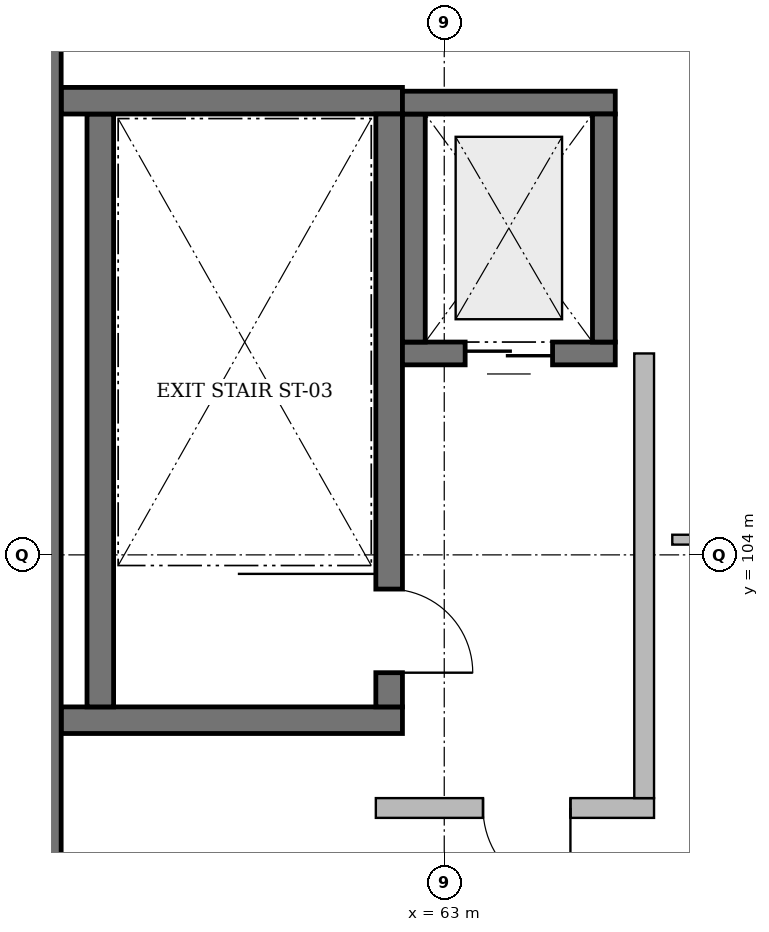
"""IFC4 building model, lengths in metres.
Left out: names, types, materials, properties, quantities, classifications, styles, units other than length and angle.
Written with IfcOpenShell. Run it as: python <this file> out.ifc"""

import sys

from ifc_helpers import new_model, si_unit, direction, frame, frame_2d, origin, place, context, subcontext, project, spatial, rectangle, extrude, element, fill, save


model = new_model("IFC4")
c1 = context("Model", 3, precision=1e-05, world=origin(), true_north=direction((0.0, 1.0)))
c2 = subcontext(c1, "Body", "Model", "MODEL_VIEW")
j1 = project(units=[si_unit("LENGTHUNIT", "METRE"), si_unit("PLANEANGLEUNIT", "RADIAN")], contexts=[c1])
p1 = place(None, origin())
s1 = spatial("IfcSite", under=j1, at=p1, CompositionType="ELEMENT")
p2 = place(p1, origin())
s2 = spatial("IfcBuilding", under=s1, at=p2, CompositionType="ELEMENT")
p3 = place(p2, frame((0.0, 0.0, 21.0)))
s3 = spatial("IfcBuildingStorey", under=s2, at=p3, CompositionType="ELEMENT", Elevation=21.0)
p4 = place(p3, frame((62.45, 101.825, 0.0), z_axis=(0.0, 0.0, 1.0), x_axis=(-1.0, 0.0, 0.0)))
e1 = element("IfcWall", 1, at=p4, inside=s3, PredefinedType="SOLIDWALL", context=c2, shape_type="SweptSolid", body=[
    extrude(rectangle(XDim=4.49, YDim=0.35, at=frame_2d((2.245, 0.0))), origin(), (0.0, 0.0, 1.0), 3.75),
])
p5 = place(p3, frame((58.475, 102.0, 0.0), z_axis=(0.0, 0.0, 1.0), x_axis=(0.0, 1.0, 0.0)))
e2 = element("IfcWall", 2, at=p5, inside=s3, PredefinedType="SOLIDWALL", context=c2, shape_type="SweptSolid", body=[
    extrude(rectangle(XDim=7.8, YDim=0.35, at=frame_2d((3.9, 0.0))), origin(), (0.0, 0.0, 1.0), 3.75),
])
p6 = place(p3, frame((57.96, 109.975, 0.0), z_axis=(0.0, 0.0, 1.0), x_axis=(1.0, 0.0, 0.0)))
e3 = element("IfcWall", 3, at=p6, inside=s3, PredefinedType="SOLIDWALL", context=c2, shape_type="SweptSolid", body=[
    extrude(rectangle(XDim=4.49, YDim=0.35, at=frame_2d((2.245, 0.0))), origin(), (0.0, 0.0, 1.0), 3.75),
])
p7 = place(p3, frame((62.275, 109.8, 0.0), z_axis=(0.0, 0.0, 1.0), x_axis=(0.0, -1.0, 0.0)))
e4 = element("IfcWall", 4, at=p7, inside=s3, PredefinedType="SOLIDWALL", context=c2, shape_type="SweptSolid", body=[
    extrude(rectangle(XDim=7.8, YDim=0.35, at=frame_2d((3.9, 0.0))), origin(), (0.0, 0.0, 1.0), 3.75),
])
p8 = place(p7, frame((6.25, 0.0, 0.0)))
e5 = element("IfcOpeningElement", 5, at=p8, cuts=e4, PredefinedType="OPENING", context=c2, shape_type="SweptSolid", body=[
    extrude(rectangle(XDim=1.1, YDim=2.15, at=frame_2d((0.55, 1.075))), frame((0.0, 0.195, 0.0), z_axis=(0.0, -1.0, 0.0), x_axis=(1.0, 0.0, 0.0)), (0.0, 0.0, 1.0), 0.39),
])
p9 = place(p3, frame((65.25, 106.65, 0.0), z_axis=(0.0, 0.0, 1.0), x_axis=(-1.0, 0.0, 0.0)))
e6 = element("IfcWall", 6, at=p9, inside=s3, PredefinedType="SOLIDWALL", context=c2, shape_type="SweptSolid", body=[
    extrude(rectangle(XDim=2.8, YDim=0.3, at=frame_2d((1.4, 0.0))), origin(), (0.0, 0.0, 1.0), 3.75),
])
p10 = place(p9, frame((0.825, 0.0, 0.0)))
e7 = element("IfcOpeningElement", 7, at=p10, cuts=e6, PredefinedType="OPENING", context=c2, shape_type="SweptSolid", body=[
    extrude(rectangle(XDim=1.15, YDim=2.1, at=frame_2d((0.575, 1.05))), frame((0.0, 0.17, 0.0), z_axis=(0.0, -1.0, 0.0), x_axis=(1.0, 0.0, 0.0)), (0.0, 0.0, 1.0), 0.34),
])
p11 = place(p3, frame((62.6, 106.8, 0.0), z_axis=(0.0, 0.0, 1.0), x_axis=(0.0, 1.0, 0.0)))
e8 = element("IfcWall", 8, at=p11, inside=s3, PredefinedType="SOLIDWALL", context=c2, shape_type="SweptSolid", body=[
    extrude(rectangle(XDim=3.0, YDim=0.3, at=frame_2d((1.5, 0.0))), origin(), (0.0, 0.0, 1.0), 3.75),
])
p12 = place(p3, frame((62.45, 109.95, 0.0), z_axis=(0.0, 0.0, 1.0), x_axis=(1.0, 0.0, 0.0)))
e9 = element("IfcWall", 9, at=p12, inside=s3, PredefinedType="SOLIDWALL", context=c2, shape_type="SweptSolid", body=[
    extrude(rectangle(XDim=2.8, YDim=0.3, at=frame_2d((1.4, 0.0))), origin(), (0.0, 0.0, 1.0), 3.75),
])
p13 = place(p3, frame((65.1, 109.8, 0.0), z_axis=(0.0, 0.0, 1.0), x_axis=(0.0, -1.0, 0.0)))
e10 = element("IfcWall", 10, at=p13, inside=s3, PredefinedType="SOLIDWALL", context=c2, shape_type="SweptSolid", body=[
    extrude(rectangle(XDim=3.0, YDim=0.3, at=frame_2d((1.5, 0.0))), origin(), (0.0, 0.0, 1.0), 3.75),
])
p14 = place(p3, frame((65.76, 100.67, 0.0), z_axis=(0.0, 0.0, 1.0), x_axis=(-1.0, 0.0, 0.0)))
e11 = element("IfcWall", 11, at=p14, inside=s3, PredefinedType="SOLIDWALL", context=c2, shape_type="SweptSolid", body=[
    extrude(rectangle(XDim=3.66, YDim=0.26, at=frame_2d((1.83, 0.0))), origin(), (0.0, 0.0, 1.0), 3.66),
])
p15 = place(p14, frame((1.1, 0.0, 0.0)))
e12 = element("IfcOpeningElement", 12, at=p15, cuts=e11, PredefinedType="OPENING", context=c2, shape_type="SweptSolid", body=[
    extrude(rectangle(XDim=1.15, YDim=2.2, at=frame_2d((0.575, 1.1))), frame((0.0, 0.15, 0.0), z_axis=(0.0, -1.0, 0.0), x_axis=(1.0, 0.0, 0.0)), (0.0, 0.0, 1.0), 0.3),
])
p16 = place(p3, frame((65.63, 106.65, 0.0), z_axis=(0.0, 0.0, 1.0), x_axis=(0.0, -1.0, 0.0)))
e13 = element("IfcWall", 13, at=p16, inside=s3, PredefinedType="SOLIDWALL", context=c2, shape_type="SweptSolid", body=[
    extrude(rectangle(XDim=5.85, YDim=0.26, at=frame_2d((2.925, 0.0))), origin(), (0.0, 0.0, 1.0), 3.66),
])
p17 = place(p3, frame((57.78, 87.8, 0.0), z_axis=(0.0, 0.0, 1.0), x_axis=(0.0, 1.0, 0.0)))
e14 = element("IfcWall", 14, at=p17, inside=s3, PredefinedType="SOLIDWALL", context=c2, shape_type="SweptSolid", body=[
    extrude(rectangle(XDim=24.0, YDim=0.36, at=frame_2d((12.0, 0.0))), origin(), (0.0, 0.0, 1.0), 3.65),
])
p18 = place(p3, frame((68.18, 104.2, 0.0), z_axis=(0.0, 0.0, 1.0), x_axis=(-1.0, 0.0, 0.0)))
e15 = element("IfcWall", 15, at=p18, inside=s3, PredefinedType="PARTITIONING", context=c2, shape_type="SweptSolid", body=[
    extrude(rectangle(XDim=2.18, YDim=0.13, at=frame_2d((1.09, 0.0))), origin(), (0.0, 0.0, 1.0), 3.66),
])
p19 = place(p8, origin())
e16 = element("IfcDoor", 16, at=p19, inside=s3, OperationType="SINGLE_SWING_RIGHT", PredefinedType="DOOR", context=c2, shape_type="SweptSolid", body=[
    extrude(rectangle(XDim=1.1, YDim=2.15, at=frame_2d((0.55, 1.075))), frame((0.0, 0.025, 0.0), z_axis=(0.0, -1.0, 0.0), x_axis=(1.0, 0.0, 0.0)), (0.0, 0.0, 1.0), 0.05),
])
fill(e5, e16)
p20 = place(p10, origin())
e17 = element("IfcDoor", 17, at=p20, inside=s3, OperationType="DOUBLE_DOOR_SLIDING", PredefinedType="DOOR", context=c2, shape_type="SweptSolid", body=[
    extrude(rectangle(XDim=1.15, YDim=2.1, at=frame_2d((0.575, 1.05))), frame((0.0, 0.025, 0.0), z_axis=(0.0, -1.0, 0.0), x_axis=(1.0, 0.0, 0.0)), (0.0, 0.0, 1.0), 0.05),
])
fill(e7, e17)
p21 = place(p15, origin())
e18 = element("IfcDoor", 18, at=p21, inside=s3, OperationType="SINGLE_SWING_LEFT", PredefinedType="DOOR", context=c2, shape_type="SweptSolid", body=[
    extrude(rectangle(XDim=1.15, YDim=2.2, at=frame_2d((0.575, 1.1))), frame((0.0, 0.025, 0.0), z_axis=(0.0, -1.0, 0.0), x_axis=(1.0, 0.0, 0.0)), (0.0, 0.0, 1.0), 0.05),
])
fill(e12, e18)
save(model, sys.argv[1])
